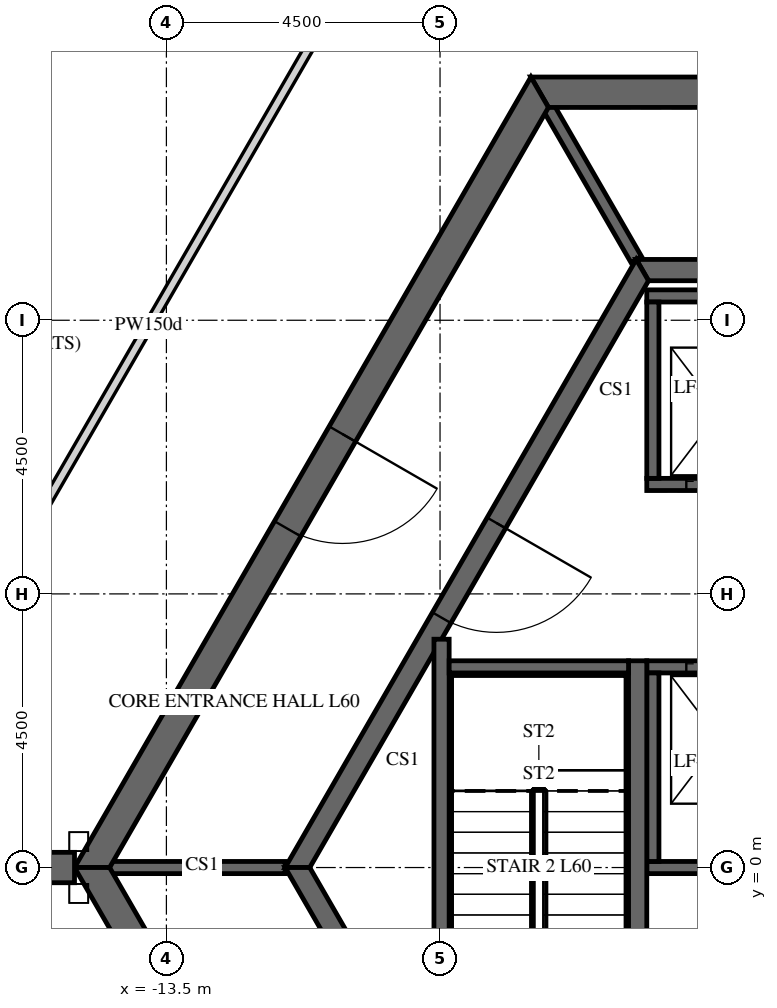
"""IFC4 building model, lengths in metres.
Left out: names, types, materials, properties, quantities, classifications, styles, units other than length and angle.
Written with IfcOpenShell. Run it as: python <this file> out.ifc"""

import sys

from ifc_helpers import new_model, si_unit, direction, frame, frame_2d, origin, place, context, subcontext, project, spatial, polyline, rectangle, outline, extrude, element, fill, save


model = new_model("IFC4")
c1 = context("Model", 3, precision=1e-05, world=origin(), true_north=direction((0.0, 1.0)))
c2 = subcontext(c1, "Body", "Model", "MODEL_VIEW")
j1 = project(units=[si_unit("LENGTHUNIT", "METRE"), si_unit("PLANEANGLEUNIT", "RADIAN")], contexts=[c1])
p1 = place(None, origin())
s1 = spatial("IfcSite", under=j1, at=p1, CompositionType="ELEMENT")
p2 = place(p1, origin())
s2 = spatial("IfcBuilding", under=s1, at=p2, CompositionType="ELEMENT")
p3 = place(p2, frame((0.0, 0.0, 250.2)))
s3 = spatial("IfcBuildingStorey", under=s2, at=p3, CompositionType="ELEMENT", Elevation=250.2)
p4 = place(p3, frame((-7.361, 12.75, -0.3), z_axis=(0.0, 0.0, 1.0), x_axis=(-0.50000571537, -0.866022103989, 0.0)))
e1 = element("IfcWall", 1, at=p4, inside=s3, PredefinedType="SHEAR", context=c2, shape_type="SweptSolid", body=[
    extrude(outline(polyline([(-0.144, -0.25), (14.867, -0.25), (14.578, 0.25), (0.144, 0.25), (-0.144, -0.25)])), origin(), (0.0, 0.0, 1.0), 5.8),
])
p5 = place(p4, frame((6.49, 0.0, 0.3)))
e2 = element("IfcOpeningElement", 2, at=p5, cuts=e1, PredefinedType="OPENING", context=c2, shape_type="SweptSolid", body=[
    extrude(rectangle(XDim=1.8, YDim=2.4, at=frame_2d((0.9, 1.2))), frame((0.0, 0.26, 0.0), z_axis=(0.0, -1.0, 0.0), x_axis=(1.0, 0.0, 0.0)), (0.0, 0.0, 1.0), 0.52),
])
p6 = place(p3, frame((-14.722, 0.0, -0.3), z_axis=(0.0, 0.0, 1.0), x_axis=(0.50000571537, -0.866022103989, 0.0)))
e3 = element("IfcWall", 3, at=p6, inside=s3, PredefinedType="SHEAR", context=c2, shape_type="SweptSolid", body=[
    extrude(outline(polyline([(-0.144, -0.25), (14.867, -0.25), (14.578, 0.25), (0.144, 0.25), (-0.144, -0.25)])), origin(), (0.0, 0.0, 1.0), 5.8),
])
p7 = place(p6, frame((6.432, 0.0, 0.3)))
e4 = element("IfcOpeningElement", 4, at=p7, cuts=e3, PredefinedType="OPENING", context=c2, shape_type="SweptSolid", body=[
    extrude(rectangle(XDim=1.8, YDim=2.4, at=frame_2d((0.9, 1.2))), frame((0.0, 0.26, 0.0), z_axis=(0.0, -1.0, 0.0), x_axis=(1.0, 0.0, 0.0)), (0.0, 0.0, 1.0), 0.52),
])
p8 = place(p3, frame((7.361, 12.75, -0.3), z_axis=(0.0, 0.0, 1.0), x_axis=(-1.0, 0.0, 0.0)))
e5 = element("IfcWall", 5, at=p8, inside=s3, PredefinedType="SHEAR", context=c2, shape_type="SweptSolid", body=[
    extrude(outline(polyline([(-0.144, -0.25), (14.866, -0.25), (14.578, 0.25), (0.144, 0.25), (-0.144, -0.25)])), origin(), (0.0, 0.0, 1.0), 5.8),
])
p9 = place(p8, frame((6.761, 0.0, 0.3)))
e6 = element("IfcOpeningElement", 6, at=p9, cuts=e5, PredefinedType="OPENING", context=c2, shape_type="SweptSolid", body=[
    extrude(rectangle(XDim=1.2, YDim=2.4, at=frame_2d((0.6, 1.2))), frame((0.0, 0.26, 0.0), z_axis=(0.0, -1.0, 0.0), x_axis=(1.0, 0.0, 0.0)), (0.0, 0.0, 1.0), 0.52),
])
p10 = place(p3, frame((-15.011, 0.0, -0.3), z_axis=(0.0, 0.0, 1.0), x_axis=(-1.0, 0.0, 0.0)))
e7 = element("IfcWall", 7, at=p10, inside=s3, PredefinedType="SHEAR", context=c2, shape_type="SweptSolid", body=[
    extrude(rectangle(XDim=15.424, YDim=0.5, at=frame_2d((7.712, 0.0))), origin(), (0.0, 0.0, 1.0), 5.8),
])
p11 = place(p10, frame((6.812, 0.0, 0.3)))
e8 = element("IfcOpeningElement", 8, at=p11, cuts=e7, PredefinedType="OPENING", context=c2, shape_type="SweptSolid", body=[
    extrude(rectangle(XDim=1.8, YDim=2.4, at=frame_2d((0.9, 1.2))), frame((0.0, 0.26, 0.0), z_axis=(0.0, -1.0, 0.0), x_axis=(1.0, 0.0, 0.0)), (0.0, 0.0, 1.0), 0.52),
])
p12 = place(p3, frame((-5.673, 9.825, -0.3), z_axis=(0.0, 0.0, 1.0), x_axis=(-0.499995046907, -0.866028263435, 0.0)))
e9 = element("IfcWall", 9, at=p12, inside=s3, PredefinedType="SHEAR", context=c2, shape_type="SweptSolid", body=[
    extrude(outline(polyline([(-0.101, -0.175), (11.446, -0.175), (11.244, 0.175), (0.101, 0.175), (-0.101, -0.175)])), origin(), (0.0, 0.0, 1.0), 5.8),
])
p13 = place(p12, frame((4.801, 0.0, 0.3)))
e10 = element("IfcOpeningElement", 10, at=p13, cuts=e9, PredefinedType="OPENING", context=c2, shape_type="SweptSolid", body=[
    extrude(rectangle(XDim=1.8, YDim=2.4, at=frame_2d((0.9, 1.2))), frame((0.0, 0.185, 0.0), z_axis=(0.0, -1.0, 0.0), x_axis=(1.0, 0.0, 0.0)), (0.0, 0.0, 1.0), 0.37),
])
p14 = place(p3, frame((-11.345, 0.0, -0.3), z_axis=(0.0, 0.0, 1.0), x_axis=(0.499995046907, -0.866028263435, 0.0)))
e11 = element("IfcWall", 11, at=p14, inside=s3, PredefinedType="SHEAR", context=c2, shape_type="SweptSolid", body=[
    extrude(outline(polyline([(-0.101, -0.175), (11.446, -0.175), (11.244, 0.175), (0.101, 0.175), (-0.101, -0.175)])), origin(), (0.0, 0.0, 1.0), 5.8),
])
p15 = place(p14, frame((4.744, 0.0, 0.3)))
e12 = element("IfcOpeningElement", 12, at=p15, cuts=e11, PredefinedType="OPENING", context=c2, shape_type="SweptSolid", body=[
    extrude(rectangle(XDim=1.8, YDim=2.4, at=frame_2d((0.9, 1.2))), frame((0.0, 0.185, 0.0), z_axis=(0.0, -1.0, 0.0), x_axis=(1.0, 0.0, 0.0)), (0.0, 0.0, 1.0), 0.37),
])
p16 = place(p3, frame((5.673, 9.825, -0.3), z_axis=(0.0, 0.0, 1.0), x_axis=(-1.0, 0.0, 0.0)))
e13 = element("IfcWall", 13, at=p16, inside=s3, PredefinedType="SHEAR", context=c2, shape_type="SweptSolid", body=[
    extrude(outline(polyline([(-0.101, -0.175), (11.446, -0.175), (11.244, 0.175), (0.101, 0.175), (-0.101, -0.175)])), origin(), (0.0, 0.0, 1.0), 5.8),
])
p17 = place(p3, frame((-5.6, 6.3, -0.25), z_axis=(0.0, 0.0, 1.0), x_axis=(1.0, 0.0, 0.0)))
e14 = element("IfcWall", 14, at=p17, inside=s3, PredefinedType="SHEAR", context=c2, shape_type="SweptSolid", body=[
    extrude(rectangle(XDim=11.2, YDim=0.2, at=frame_2d((5.6, 0.0))), origin(), (0.0, 0.0, 1.0), 5.75),
])
p18 = place(p17, frame((8.45, 0.0, 0.25)))
e15 = element("IfcOpeningElement", 15, at=p18, cuts=e14, PredefinedType="OPENING", context=c2, shape_type="SweptSolid", body=[
    extrude(rectangle(XDim=0.9, YDim=2.1, at=frame_2d((0.45, 1.05))), frame((0.0, 0.11, 0.0), z_axis=(0.0, -1.0, 0.0), x_axis=(1.0, 0.0, 0.0)), (0.0, 0.0, 1.0), 0.22),
])
p19 = place(p17, frame((0.65, 0.0, 0.25)))
e16 = element("IfcOpeningElement", 16, at=p19, cuts=e14, PredefinedType="OPENING", context=c2, shape_type="SweptSolid", body=[
    extrude(rectangle(XDim=1.1, YDim=2.1, at=frame_2d((0.55, 1.05))), frame((0.0, 0.11, 0.0), z_axis=(0.0, -1.0, 0.0), x_axis=(1.0, 0.0, 0.0)), (0.0, 0.0, 1.0), 0.22),
])
p20 = place(p17, frame((2.85, 0.0, 0.25)))
e17 = element("IfcOpeningElement", 17, at=p20, cuts=e14, PredefinedType="OPENING", context=c2, shape_type="SweptSolid", body=[
    extrude(rectangle(XDim=1.1, YDim=2.1, at=frame_2d((0.55, 1.05))), frame((0.0, 0.11, 0.0), z_axis=(0.0, -1.0, 0.0), x_axis=(1.0, 0.0, 0.0)), (0.0, 0.0, 1.0), 0.22),
])
p21 = place(p17, frame((5.05, 0.0, 0.25)))
e18 = element("IfcOpeningElement", 18, at=p21, cuts=e14, PredefinedType="OPENING", context=c2, shape_type="SweptSolid", body=[
    extrude(rectangle(XDim=1.1, YDim=2.1, at=frame_2d((0.55, 1.05))), frame((0.0, 0.11, 0.0), z_axis=(0.0, -1.0, 0.0), x_axis=(1.0, 0.0, 0.0)), (0.0, 0.0, 1.0), 0.22),
])
p22 = place(p3, frame((-5.6, 9.4, -0.25), z_axis=(0.0, 0.0, 1.0), x_axis=(1.0, 0.0, 0.0)))
e19 = element("IfcWall", 19, at=p22, inside=s3, PredefinedType="SHEAR", context=c2, shape_type="SweptSolid", body=[
    extrude(rectangle(XDim=11.2, YDim=0.2, at=frame_2d((5.6, 0.0))), origin(), (0.0, 0.0, 1.0), 5.75),
])
p23 = place(p3, frame((-5.5, 6.4, -0.25), z_axis=(0.0, 0.0, 1.0), x_axis=(0.0, 1.0, 0.0)))
e20 = element("IfcWall", 20, at=p23, inside=s3, PredefinedType="SHEAR", context=c2, shape_type="SweptSolid", body=[
    extrude(rectangle(XDim=2.9, YDim=0.2, at=frame_2d((1.45, 0.0))), origin(), (0.0, 0.0, 1.0), 5.75),
])
p24 = place(p3, frame((-5.6, 3.3, -0.25), z_axis=(0.0, 0.0, 1.0), x_axis=(1.0, 0.0, 0.0)))
e21 = element("IfcWall", 21, at=p24, inside=s3, PredefinedType="SHEAR", context=c2, shape_type="SweptSolid", body=[
    extrude(rectangle(XDim=11.2, YDim=0.2, at=frame_2d((5.6, 0.0))), origin(), (0.0, 0.0, 1.0), 5.75),
])
p25 = place(p24, frame((0.65, 0.0, 0.25)))
e22 = element("IfcOpeningElement", 22, at=p25, cuts=e21, PredefinedType="OPENING", context=c2, shape_type="SweptSolid", body=[
    extrude(rectangle(XDim=1.1, YDim=2.1, at=frame_2d((0.55, 1.05))), frame((0.0, 0.11, 0.0), z_axis=(0.0, -1.0, 0.0), x_axis=(1.0, 0.0, 0.0)), (0.0, 0.0, 1.0), 0.22),
])
p26 = place(p24, frame((2.85, 0.0, 0.25)))
e23 = element("IfcOpeningElement", 23, at=p26, cuts=e21, PredefinedType="OPENING", context=c2, shape_type="SweptSolid", body=[
    extrude(rectangle(XDim=1.1, YDim=2.1, at=frame_2d((0.55, 1.05))), frame((0.0, 0.11, 0.0), z_axis=(0.0, -1.0, 0.0), x_axis=(1.0, 0.0, 0.0)), (0.0, 0.0, 1.0), 0.22),
])
p27 = place(p24, frame((5.05, 0.0, 0.25)))
e24 = element("IfcOpeningElement", 24, at=p27, cuts=e21, PredefinedType="OPENING", context=c2, shape_type="SweptSolid", body=[
    extrude(rectangle(XDim=1.1, YDim=2.1, at=frame_2d((0.55, 1.05))), frame((0.0, 0.11, 0.0), z_axis=(0.0, -1.0, 0.0), x_axis=(1.0, 0.0, 0.0)), (0.0, 0.0, 1.0), 0.22),
])
p28 = place(p24, frame((7.25, 0.0, 0.25)))
e25 = element("IfcOpeningElement", 25, at=p28, cuts=e21, PredefinedType="OPENING", context=c2, shape_type="SweptSolid", body=[
    extrude(rectangle(XDim=1.1, YDim=2.1, at=frame_2d((0.55, 1.05))), frame((0.0, 0.11, 0.0), z_axis=(0.0, -1.0, 0.0), x_axis=(1.0, 0.0, 0.0)), (0.0, 0.0, 1.0), 0.22),
])
p29 = place(p24, frame((9.45, 0.0, 0.25)))
e26 = element("IfcOpeningElement", 26, at=p29, cuts=e21, PredefinedType="OPENING", context=c2, shape_type="SweptSolid", body=[
    extrude(rectangle(XDim=1.1, YDim=2.1, at=frame_2d((0.55, 1.05))), frame((0.0, 0.11, 0.0), z_axis=(0.0, -1.0, 0.0), x_axis=(1.0, 0.0, 0.0)), (0.0, 0.0, 1.0), 0.22),
])
p30 = place(p3, frame((-5.6, 0.0, -0.25), z_axis=(0.0, 0.0, 1.0), x_axis=(1.0, 0.0, 0.0)))
e27 = element("IfcWall", 27, at=p30, inside=s3, PredefinedType="SHEAR", context=c2, shape_type="SweptSolid", body=[
    extrude(rectangle(XDim=11.2, YDim=0.2, at=frame_2d((5.6, 0.0))), origin(), (0.0, 0.0, 1.0), 5.75),
])
p31 = place(p3, frame((-5.5, 0.1, -0.25), z_axis=(0.0, 0.0, 1.0), x_axis=(0.0, 1.0, 0.0)))
e28 = element("IfcWall", 28, at=p31, inside=s3, PredefinedType="SHEAR", context=c2, shape_type="SweptSolid", body=[
    extrude(rectangle(XDim=3.1, YDim=0.2, at=frame_2d((1.55, 0.0))), origin(), (0.0, 0.0, 1.0), 5.75),
])
for number, where, z_axis, x_axis in (
    (29, (-5.773, 10.0, -0.3), (0.0, 0.0, 1.0), (-0.5, 0.866, 0.0)),
    (30, (-11.547, 0.0, -0.3), (0.0, 0.0, 1.0), (-1.0, 0.0, 0.0)),
):
    element("IfcWall", number, at=place(p3, frame(where, z_axis=z_axis, x_axis=x_axis)), inside=s3, PredefinedType="SHEAR", context=c2, shape_type="SweptSolid", body=[
        extrude(rectangle(XDim=2.887, YDim=0.2, at=frame_2d((1.443, 0.0))), origin(), (0.0, 0.0, 1.0), 5.8),
    ])
p32 = place(p3, frame((-5.75, -3.4, -0.25), z_axis=(0.0, 0.0, 1.0), x_axis=(0.0, 1.0, 0.0)))
e31 = element("IfcWall", 31, at=p32, inside=s3, PredefinedType="SHEAR", context=c2, shape_type="SweptSolid", body=[
    extrude(rectangle(XDim=6.8, YDim=0.3, at=frame_2d((3.4, 0.0))), origin(), (0.0, 0.0, 1.0), 5.75),
])
p33 = place(p3, frame((-8.975, -3.755, -0.25), z_axis=(0.0, 0.0, 1.0), x_axis=(0.0, 1.0, 0.0)))
e32 = element("IfcWall", 32, at=p33, inside=s3, PredefinedType="SHEAR", context=c2, shape_type="SweptSolid", body=[
    extrude(rectangle(XDim=7.51, YDim=0.25, at=frame_2d((3.755, 0.0))), origin(), (0.0, 0.0, 1.0), 5.75),
])
p34 = place(p3, frame((-8.85, 3.3, -0.25), z_axis=(0.0, 0.0, 1.0), x_axis=(1.0, 0.0, 0.0)))
e33 = element("IfcWall", 33, at=p34, inside=s3, PredefinedType="SHEAR", context=c2, shape_type="SweptSolid", body=[
    extrude(rectangle(XDim=2.95, YDim=0.2, at=frame_2d((1.475, 0.0))), origin(), (0.0, 0.0, 1.0), 5.75),
])
p35 = place(p3, frame((-13.172, 19.825, 0.0), z_axis=(0.0, 0.0, 1.0), x_axis=(-0.499999503755, -0.866025690291, 0.0)))
e34 = element("IfcWall", 34, at=p35, inside=s3, PredefinedType="PARTITIONING", context=c2, shape_type="SweptSolid", body=[
    extrude(rectangle(XDim=18.943, YDim=0.2, at=frame_2d((9.471, 0.0))), origin(), (0.0, 0.0, 1.0), 5.5),
])
p36 = place(p35, frame((8.572, 0.0, 0.0)))
e35 = element("IfcOpeningElement", 35, at=p36, cuts=e34, PredefinedType="OPENING", context=c2, shape_type="SweptSolid", body=[
    extrude(rectangle(XDim=1.8, YDim=2.1, at=frame_2d((0.9, 1.05))), frame((0.0, 0.11, 0.0), z_axis=(0.0, -1.0, 0.0), x_axis=(1.0, 0.0, 0.0)), (0.0, 0.0, 1.0), 0.22),
])
p37 = place(p3, frame((-10.174, 15.177, 0.0), z_axis=(0.0, 0.0, 1.0), x_axis=(-0.500018949701, -0.866014462893, 0.0)))
e36 = element("IfcWall", 36, at=p37, inside=s3, PredefinedType="PARTITIONING", context=c2, shape_type="SweptSolid", body=[
    extrude(rectangle(XDim=14.469, YDim=0.15, at=frame_2d((7.235, 0.0))), origin(), (0.0, 0.0, 1.0), 5.5),
])
p38 = place(p5, origin())
e37 = element("IfcDoor", 37, at=p38, inside=s3, OperationType="DOUBLE_DOOR_SINGLE_SWING", PredefinedType="DOOR", context=c2, shape_type="SweptSolid", body=[
    extrude(rectangle(XDim=1.8, YDim=2.4, at=frame_2d((0.9, 1.2))), frame((0.0, 0.025, 0.0), z_axis=(0.0, -1.0, 0.0), x_axis=(1.0, 0.0, 0.0)), (0.0, 0.0, 1.0), 0.05),
])
fill(e2, e37)
p39 = place(p13, origin())
e38 = element("IfcDoor", 38, at=p39, inside=s3, OperationType="DOUBLE_DOOR_SINGLE_SWING", PredefinedType="DOOR", context=c2, shape_type="SweptSolid", body=[
    extrude(rectangle(XDim=1.8, YDim=2.4, at=frame_2d((0.9, 1.2))), frame((0.0, 0.025, 0.0), z_axis=(0.0, -1.0, 0.0), x_axis=(1.0, 0.0, 0.0)), (0.0, 0.0, 1.0), 0.05),
])
fill(e10, e38)
p40 = place(p19, origin())
e39 = element("IfcDoor", 39, at=p40, inside=s3, OperationType="SLIDING_TO_LEFT", PredefinedType="DOOR", context=c2, shape_type="SweptSolid", body=[
    extrude(rectangle(XDim=1.1, YDim=2.1, at=frame_2d((0.55, 1.05))), frame((0.0, 0.025, 0.0), z_axis=(0.0, -1.0, 0.0), x_axis=(1.0, 0.0, 0.0)), (0.0, 0.0, 1.0), 0.05),
])
fill(e16, e39)
p41 = place(p25, origin())
e40 = element("IfcDoor", 40, at=p41, inside=s3, OperationType="SLIDING_TO_LEFT", PredefinedType="DOOR", context=c2, shape_type="SweptSolid", body=[
    extrude(rectangle(XDim=1.1, YDim=2.1, at=frame_2d((0.55, 1.05))), frame((0.0, 0.025, 0.0), z_axis=(0.0, -1.0, 0.0), x_axis=(1.0, 0.0, 0.0)), (0.0, 0.0, 1.0), 0.05),
])
fill(e22, e40)
save(model, sys.argv[1])
